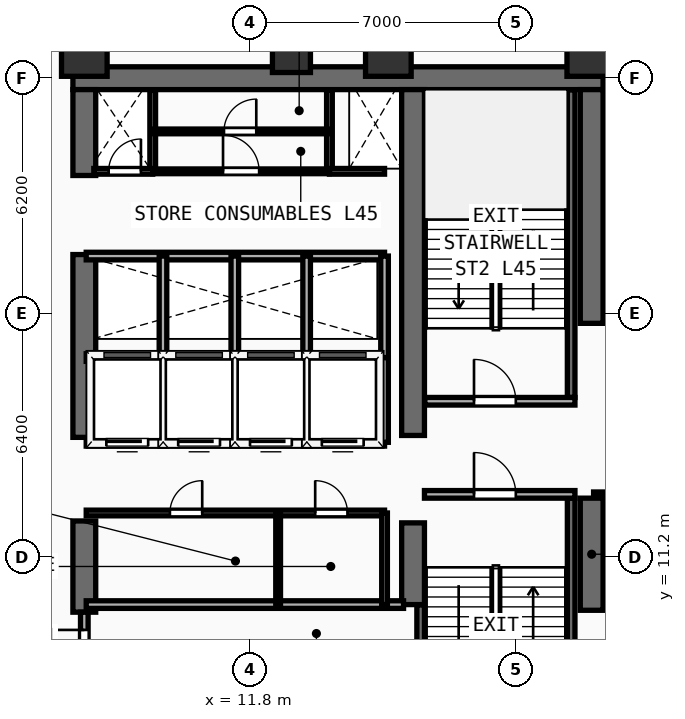
"""IFC4 building model, lengths in metres.
Left out: names, types, materials, properties, quantities, classifications, styles, units other than length and angle.
Written with IfcOpenShell. Run it as: python <this file> out.ifc"""

import sys

from ifc_helpers import new_model, si_unit, direction, frame, frame_2d, origin, origin_2d, place, context, subcontext, project, spatial, rectangle, extrude, element, fill, save


model = new_model("IFC4")
c1 = context("Model", 3, precision=1e-05, world=origin(), true_north=direction((0.0, 1.0)))
c2 = subcontext(c1, "Body", "Model", "MODEL_VIEW")
j1 = project(units=[si_unit("LENGTHUNIT", "METRE"), si_unit("PLANEANGLEUNIT", "RADIAN")], contexts=[c1])
p1 = place(None, origin())
s1 = spatial("IfcSite", under=j1, at=p1, CompositionType="ELEMENT")
p2 = place(p1, origin())
s2 = spatial("IfcBuilding", under=s1, at=p2, CompositionType="ELEMENT")
p3 = place(p2, frame((0.0, 0.0, 176.6)))
s3 = spatial("IfcBuildingStorey", under=s2, at=p3, CompositionType="ELEMENT", Elevation=176.6)
p4 = place(p3, frame((7.15, 23.8, 0.0), z_axis=(0.0, 0.0, 1.0), x_axis=(1.0, 0.0, 0.0)))
e1 = element("IfcWall", 1, at=p4, inside=s3, PredefinedType="SHEAR", context=c2, shape_type="SweptSolid", body=[
    extrude(rectangle(XDim=13.95, YDim=0.6, at=frame_2d((6.975, 0.0))), origin(), (0.0, 0.0, 1.0), 3.56),
])
p5 = place(p3, frame((7.45, 9.75, 0.0), z_axis=(0.0, 0.0, 1.0), x_axis=(0.0, 1.0, 0.0)))
e2 = element("IfcWall", 2, at=p5, inside=s3, PredefinedType="SHEAR", context=c2, shape_type="SweptSolid", body=[
    extrude(rectangle(XDim=2.4, YDim=0.6, at=frame_2d((1.2, 0.0))), origin(), (0.0, 0.0, 1.0), 3.56),
])
p6 = place(p3, frame((7.45, 14.35, 0.0), z_axis=(0.0, 0.0, 1.0), x_axis=(0.0, 1.0, 0.0)))
e3 = element("IfcWall", 3, at=p6, inside=s3, PredefinedType="SHEAR", context=c2, shape_type="SweptSolid", body=[
    extrude(rectangle(XDim=4.81, YDim=0.6, at=frame_2d((2.405, 0.0))), origin(), (0.0, 0.0, 1.0), 3.56),
])
p7 = place(p3, frame((7.45, 21.24, 0.0), z_axis=(0.0, 0.0, 1.0), x_axis=(0.0, 1.0, 0.0)))
e4 = element("IfcWall", 4, at=p7, inside=s3, PredefinedType="SHEAR", context=c2, shape_type="SweptSolid", body=[
    extrude(rectangle(XDim=2.26, YDim=0.6, at=frame_2d((1.13, 0.0))), origin(), (0.0, 0.0, 1.0), 3.56),
])
p8 = place(p3, frame((20.8, 9.8, 0.0), z_axis=(0.0, 0.0, 1.0), x_axis=(0.0, 1.0, 0.0)))
e5 = element("IfcWall", 5, at=p8, inside=s3, PredefinedType="SHEAR", context=c2, shape_type="SweptSolid", body=[
    extrude(rectangle(XDim=2.95, YDim=0.6, at=frame_2d((1.475, 0.0))), origin(), (0.0, 0.0, 1.0), 3.56),
])
p9 = place(p3, frame((20.8, 17.35, 0.0), z_axis=(0.0, 0.0, 1.0), x_axis=(0.0, 1.0, 0.0)))
e6 = element("IfcWall", 6, at=p9, inside=s3, PredefinedType="SHEAR", context=c2, shape_type="SweptSolid", body=[
    extrude(rectangle(XDim=6.15, YDim=0.6, at=frame_2d((3.075, 0.0))), origin(), (0.0, 0.0, 1.0), 3.56),
])
p10 = place(p3, frame((16.1, 9.95, 0.0), z_axis=(0.0, 0.0, 1.0), x_axis=(0.0, 1.0, 0.0)))
e7 = element("IfcWall", 7, at=p10, inside=s3, PredefinedType="SHEAR", context=c2, shape_type="SweptSolid", body=[
    extrude(rectangle(XDim=2.15, YDim=0.6, at=frame_2d((1.075, 0.0))), origin(), (0.0, 0.0, 1.0), 3.56),
])
p11 = place(p3, frame((16.1, 14.4, 0.0), z_axis=(0.0, 0.0, 1.0), x_axis=(0.0, 1.0, 0.0)))
e8 = element("IfcWall", 8, at=p11, inside=s3, PredefinedType="SHEAR", context=c2, shape_type="SweptSolid", body=[
    extrude(rectangle(XDim=9.1, YDim=0.6, at=frame_2d((4.55, 0.0))), origin(), (0.0, 0.0, 1.0), 3.56),
])
for number, where, z_axis, x_axis in (
    (9, (7.45, 24.45, 0.0), (0.0, 0.0, 1.0), (1.0, 0.0, 0.0)),
    (10, (15.45, 24.45, 0.0), (0.0, 0.0, 1.0), (1.0, 0.0, 0.0)),
    (11, (20.75, 24.45, 0.0), (0.0, 0.0, 1.0), (1.0, 0.0, 0.0)),
):
    element("IfcColumn", number, at=place(p3, frame(where, z_axis=z_axis, x_axis=x_axis)), inside=s3, PredefinedType="COLUMN", context=c2, shape_type="SweptSolid", body=[
        extrude(rectangle(XDim=1.2, YDim=1.2, at=origin_2d()), origin(), (0.0, 0.0, 1.0), 3.56),
    ])
p12 = place(p3, frame((12.9, 24.45, 0.0), z_axis=(0.0, 0.0, 1.0), x_axis=(1.0, 0.0, 0.0)))
e12 = element("IfcColumn", 12, at=p12, inside=s3, PredefinedType="COLUMN", context=c2, shape_type="SweptSolid", body=[
    extrude(rectangle(XDim=1.0, YDim=1.0, at=origin_2d()), origin(), (0.0, 0.0, 1.0), 3.56),
])
p13 = place(p3, frame((16.3, 7.36, 0.0), z_axis=(0.0, 0.0, 1.0), x_axis=(0.0, 1.0, 0.0)))
e13 = element("IfcWall", 13, at=p13, inside=s3, PredefinedType="SHEAR", context=c2, shape_type="SweptSolid", body=[
    extrude(rectangle(XDim=2.58, YDim=0.2, at=frame_2d((1.29, 0.0))), origin(), (0.0, 0.0, 1.0), 3.56),
])
p14 = place(p3, frame((20.26, 4.66, 0.0), z_axis=(0.0, 0.0, 1.0), x_axis=(0.0, 1.0, 0.0)))
e14 = element("IfcWall", 14, at=p14, inside=s3, PredefinedType="SHEAR", context=c2, shape_type="SweptSolid", body=[
    extrude(rectangle(XDim=8.09, YDim=0.2, at=frame_2d((4.045, 0.0))), origin(), (0.0, 0.0, 1.0), 3.56),
])
p15 = place(p3, frame((16.4, 12.85, 0.0), z_axis=(0.0, 0.0, 1.0), x_axis=(1.0, 0.0, 0.0)))
e15 = element("IfcWall", 15, at=p15, inside=s3, PredefinedType="PARTITIONING", context=c2, shape_type="SweptSolid", body=[
    extrude(rectangle(XDim=3.96, YDim=0.2, at=frame_2d((1.98, 0.0))), origin(), (0.0, 0.0, 1.0), 3.56),
])
p16 = place(p15, frame((1.304, 0.0, 0.0)))
e16 = element("IfcOpeningElement", 16, at=p16, cuts=e15, PredefinedType="OPENING", context=c2, shape_type="SweptSolid", body=[
    extrude(rectangle(XDim=1.1, YDim=2.2, at=frame_2d((0.55, 1.1))), frame((0.0, 0.11, 0.0), z_axis=(0.0, -1.0, 0.0), x_axis=(1.0, 0.0, 0.0)), (0.0, 0.0, 1.0), 0.22),
])
p17 = place(p3, frame((20.26, 15.4, 0.0), z_axis=(0.0, 0.0, 1.0), x_axis=(0.0, 1.0, 0.0)))
e17 = element("IfcWall", 17, at=p17, inside=s3, PredefinedType="SHEAR", context=c2, shape_type="SweptSolid", body=[
    extrude(rectangle(XDim=8.09, YDim=0.2, at=frame_2d((4.045, 0.0))), origin(), (0.0, 0.0, 1.0), 3.56),
])
p18 = place(p3, frame((16.41, 15.3, 0.0), z_axis=(0.0, 0.0, 1.0), x_axis=(1.0, 0.0, 0.0)))
e18 = element("IfcWall", 18, at=p18, inside=s3, PredefinedType="PARTITIONING", context=c2, shape_type="SweptSolid", body=[
    extrude(rectangle(XDim=3.95, YDim=0.2, at=frame_2d((1.975, 0.0))), origin(), (0.0, 0.0, 1.0), 3.56),
])
p19 = place(p18, frame((1.294, 0.0, 0.0)))
e19 = element("IfcOpeningElement", 19, at=p19, cuts=e18, PredefinedType="OPENING", context=c2, shape_type="SweptSolid", body=[
    extrude(rectangle(XDim=1.1, YDim=2.2, at=frame_2d((0.55, 1.1))), frame((0.0, 0.11, 0.0), z_axis=(0.0, -1.0, 0.0), x_axis=(1.0, 0.0, 0.0)), (0.0, 0.0, 1.0), 0.22),
])
p20 = place(p3, frame((7.5, 9.95, 0.0), z_axis=(0.0, 0.0, 1.0), x_axis=(1.0, 0.0, 0.0)))
e20 = element("IfcWall", 20, at=p20, inside=s3, PredefinedType="PARTITIONING", context=c2, shape_type="SweptSolid", body=[
    extrude(rectangle(XDim=8.35, YDim=0.2, at=frame_2d((4.175, 0.0))), origin(), (0.0, 0.0, 1.0), 3.56),
])
p21 = place(p3, frame((7.45, 7.45, 0.0), z_axis=(0.0, 0.0, 1.0), x_axis=(0.0, 1.0, 0.0)))
e21 = element("IfcWall", 21, at=p21, inside=s3, PredefinedType="PARTITIONING", context=c2, shape_type="SweptSolid", body=[
    extrude(rectangle(XDim=2.3, YDim=0.2, at=frame_2d((1.15, 0.0))), origin(), (0.0, 0.0, 1.0), 2.54),
])
p22 = place(p21, frame((0.633, 0.0, 0.0)))
e22 = element("IfcOpeningElement", 22, at=p22, cuts=e21, PredefinedType="OPENING", context=c2, shape_type="SweptSolid", body=[
    extrude(rectangle(XDim=1.2, YDim=2.25, at=frame_2d((0.6, 1.125))), frame((0.0, 0.11, 0.0), z_axis=(0.0, -1.0, 0.0), x_axis=(1.0, 0.0, 0.0)), (0.0, 0.0, 1.0), 0.22),
])
p23 = place(p3, frame((7.5, 12.36, 0.0), z_axis=(0.0, 0.0, 1.0), x_axis=(1.0, 0.0, 0.0)))
e23 = element("IfcWall", 23, at=p23, inside=s3, PredefinedType="PARTITIONING", context=c2, shape_type="SweptSolid", body=[
    extrude(rectangle(XDim=7.85, YDim=0.15, at=frame_2d((3.925, 0.0))), origin(), (0.0, 0.0, 1.0), 3.56),
])
p24 = place(p23, frame((2.202, 0.0, 0.0)))
e24 = element("IfcOpeningElement", 24, at=p24, cuts=e23, PredefinedType="OPENING", context=c2, shape_type="SweptSolid", body=[
    extrude(rectangle(XDim=0.85, YDim=2.15, at=frame_2d((0.425, 1.075))), frame((0.0, 0.085, 0.0), z_axis=(0.0, -1.0, 0.0), x_axis=(1.0, 0.0, 0.0)), (0.0, 0.0, 1.0), 0.17),
])
p25 = place(p23, frame((6.025, 0.0, 0.0)))
e25 = element("IfcOpeningElement", 25, at=p25, cuts=e23, PredefinedType="OPENING", context=c2, shape_type="SweptSolid", body=[
    extrude(rectangle(XDim=0.85, YDim=2.15, at=frame_2d((0.425, 1.075))), frame((0.0, 0.085, 0.0), z_axis=(0.0, -1.0, 0.0), x_axis=(1.0, 0.0, 0.0)), (0.0, 0.0, 1.0), 0.17),
])
p26 = place(p3, frame((15.35, 9.95, 0.0), z_axis=(0.0, 0.0, 1.0), x_axis=(0.0, 1.0, 0.0)))
e26 = element("IfcWall", 26, at=p26, inside=s3, PredefinedType="PARTITIONING", context=c2, shape_type="SweptSolid", body=[
    extrude(rectangle(XDim=2.41, YDim=0.15, at=frame_2d((1.205, 0.0))), origin(), (0.0, 0.0, 1.0), 3.56),
])
p27 = place(p3, frame((12.55, 9.95, 0.0), z_axis=(0.0, 0.0, 1.0), x_axis=(0.0, 1.0, 0.0)))
e27 = element("IfcWall", 27, at=p27, inside=s3, PredefinedType="PARTITIONING", context=c2, shape_type="SweptSolid", body=[
    extrude(rectangle(XDim=2.41, YDim=0.125, at=frame_2d((1.205, 0.0))), origin(), (0.0, 0.0, 1.0), 3.56),
])
p28 = place(p3, frame((7.5, 14.22, 0.0), z_axis=(0.0, 0.0, 1.0), x_axis=(1.0, 0.0, 0.0)))
e28 = element("IfcWall", 28, at=p28, inside=s3, PredefinedType="PARTITIONING", context=c2, shape_type="SweptSolid", body=[
    extrude(rectangle(XDim=7.85, YDim=0.2, at=frame_2d((3.925, 0.0))), origin(), (0.0, 0.0, 1.0), 3.56),
])
p29 = place(p28, frame((0.53, 0.0, 0.0)))
e29 = element("IfcOpeningElement", 29, at=p29, cuts=e28, PredefinedType="OPENING", context=c2, shape_type="SweptSolid", body=[
    extrude(rectangle(XDim=1.1, YDim=2.2, at=frame_2d((0.55, 1.1))), frame((0.0, 0.11, 0.0), z_axis=(0.0, -1.0, 0.0), x_axis=(1.0, 0.0, 0.0)), (0.0, 0.0, 1.0), 0.22),
])
p30 = place(p28, frame((2.42, 0.0, 0.0)))
e30 = element("IfcOpeningElement", 30, at=p30, cuts=e28, PredefinedType="OPENING", context=c2, shape_type="SweptSolid", body=[
    extrude(rectangle(XDim=1.1, YDim=2.2, at=frame_2d((0.55, 1.1))), frame((0.0, 0.11, 0.0), z_axis=(0.0, -1.0, 0.0), x_axis=(1.0, 0.0, 0.0)), (0.0, 0.0, 1.0), 0.22),
])
p31 = place(p28, frame((4.31, 0.0, 0.0)))
e31 = element("IfcOpeningElement", 31, at=p31, cuts=e28, PredefinedType="OPENING", context=c2, shape_type="SweptSolid", body=[
    extrude(rectangle(XDim=1.1, YDim=2.2, at=frame_2d((0.55, 1.1))), frame((0.0, 0.11, 0.0), z_axis=(0.0, -1.0, 0.0), x_axis=(1.0, 0.0, 0.0)), (0.0, 0.0, 1.0), 0.22),
])
p32 = place(p28, frame((6.2, 0.0, 0.0)))
e32 = element("IfcOpeningElement", 32, at=p32, cuts=e28, PredefinedType="OPENING", context=c2, shape_type="SweptSolid", body=[
    extrude(rectangle(XDim=1.1, YDim=2.2, at=frame_2d((0.55, 1.1))), frame((0.0, 0.11, 0.0), z_axis=(0.0, -1.0, 0.0), x_axis=(1.0, 0.0, 0.0)), (0.0, 0.0, 1.0), 0.22),
])
p33 = place(p3, frame((7.5, 16.45, 0.0), z_axis=(0.0, 0.0, 1.0), x_axis=(1.0, 0.0, 0.0)))
e33 = element("IfcWall", 33, at=p33, inside=s3, PredefinedType="PARTITIONING", context=c2, shape_type="SweptSolid", body=[
    extrude(rectangle(XDim=7.85, YDim=0.2, at=frame_2d((3.925, 0.0))), origin(), (0.0, 0.0, 1.0), 3.56),
])
for number, where, z_axis, x_axis in (
    (34, (15.35, 14.22, 0.0), (0.0, 0.0, 1.0), (0.0, 1.0, 0.0)),
    (35, (9.52, 14.22, 0.0), (0.0, 0.0, 1.0), (0.0, 1.0, 0.0)),
    (36, (11.41, 14.22, 0.0), (0.0, 0.0, 1.0), (0.0, 1.0, 0.0)),
    (37, (13.3, 14.22, 0.0), (0.0, 0.0, 1.0), (0.0, 1.0, 0.0)),
):
    element("IfcWall", number, at=place(p3, frame(where, z_axis=z_axis, x_axis=x_axis)), inside=s3, PredefinedType="PARTITIONING", context=c2, shape_type="SweptSolid", body=[
        extrude(rectangle(XDim=2.23, YDim=0.2, at=frame_2d((1.115, 0.0))), origin(), (0.0, 0.0, 1.0), 3.56),
    ])
p34 = place(p3, frame((7.5, 19.12, 0.0), z_axis=(0.0, 0.0, 1.0), x_axis=(1.0, 0.0, 0.0)))
e38 = element("IfcWall", 38, at=p34, inside=s3, PredefinedType="PARTITIONING", context=c2, shape_type="SweptSolid", body=[
    extrude(rectangle(XDim=7.85, YDim=0.2, at=frame_2d((3.925, 0.0))), origin(), (0.0, 0.0, 1.0), 3.56),
])
for number, where, z_axis, x_axis in (
    (39, (15.35, 16.45, 0.0), (0.0, 0.0, 1.0), (0.0, 1.0, 0.0)),
    (40, (9.52, 16.45, 0.0), (0.0, 0.0, 1.0), (0.0, 1.0, 0.0)),
    (41, (11.41, 16.45, 0.0), (0.0, 0.0, 1.0), (0.0, 1.0, 0.0)),
    (42, (13.3, 16.45, 0.0), (0.0, 0.0, 1.0), (0.0, 1.0, 0.0)),
):
    element("IfcWall", number, at=place(p3, frame(where, z_axis=z_axis, x_axis=x_axis)), inside=s3, PredefinedType="PARTITIONING", context=c2, shape_type="SweptSolid", body=[
        extrude(rectangle(XDim=2.67, YDim=0.2, at=frame_2d((1.335, 0.0))), origin(), (0.0, 0.0, 1.0), 3.56),
    ])
for number, where, z_axis, x_axis in (
    (43, (9.25, 21.35, 0.0), (0.0, 0.0, 1.0), (0.0, 1.0, 0.0)),
    (44, (13.9, 21.35, 0.0), (0.0, 0.0, 1.0), (0.0, 1.0, 0.0)),
):
    element("IfcWall", number, at=place(p3, frame(where, z_axis=z_axis, x_axis=x_axis)), inside=s3, PredefinedType="PARTITIONING", context=c2, shape_type="SweptSolid", body=[
        extrude(rectangle(XDim=2.13, YDim=0.15, at=frame_2d((1.065, 0.0))), origin(), (0.0, 0.0, 1.0), 3.56),
    ])
p35 = place(p3, frame((7.7, 21.35, 0.0), z_axis=(0.0, 0.0, 1.0), x_axis=(1.0, 0.0, 0.0)))
e45 = element("IfcWall", 45, at=p35, inside=s3, PredefinedType="PARTITIONING", context=c2, shape_type="SweptSolid", body=[
    extrude(rectangle(XDim=1.55, YDim=0.15, at=frame_2d((0.775, 0.0))), origin(), (0.0, 0.0, 1.0), 3.56),
])
p36 = place(p35, frame((0.39, 0.0, 0.0)))
e46 = element("IfcOpeningElement", 46, at=p36, cuts=e45, PredefinedType="OPENING", context=c2, shape_type="SweptSolid", body=[
    extrude(rectangle(XDim=0.85, YDim=2.15, at=frame_2d((0.425, 1.075))), frame((0.0, 0.085, 0.0), z_axis=(0.0, -1.0, 0.0), x_axis=(1.0, 0.0, 0.0)), (0.0, 0.0, 1.0), 0.17),
])
p37 = place(p3, frame((13.9, 21.35, 0.0), z_axis=(0.0, 0.0, 1.0), x_axis=(1.0, 0.0, 0.0)))
e47 = element("IfcWall", 47, at=p37, inside=s3, PredefinedType="PARTITIONING", context=c2, shape_type="SweptSolid", body=[
    extrude(rectangle(XDim=1.45, YDim=0.15, at=frame_2d((0.725, 0.0))), origin(), (0.0, 0.0, 1.0), 3.56),
])
p38 = place(p3, frame((9.25, 21.35, 0.0), z_axis=(0.0, 0.0, 1.0), x_axis=(1.0, 0.0, 0.0)))
e48 = element("IfcWall", 48, at=p38, inside=s3, PredefinedType="PARTITIONING", context=c2, shape_type="SweptSolid", body=[
    extrude(rectangle(XDim=4.65, YDim=0.125, at=frame_2d((2.325, 0.0))), origin(), (0.0, 0.0, 1.0), 3.56),
])
p39 = place(p38, frame((1.85, 0.0, 0.0)))
e49 = element("IfcOpeningElement", 49, at=p39, cuts=e48, PredefinedType="OPENING", context=c2, shape_type="SweptSolid", body=[
    extrude(rectangle(XDim=0.95, YDim=2.15, at=frame_2d((0.475, 1.075))), frame((0.0, 0.073, 0.0), z_axis=(0.0, -1.0, 0.0), x_axis=(1.0, 0.0, 0.0)), (0.0, 0.0, 1.0), 0.145),
])
p40 = place(p3, frame((9.25, 22.4, 0.0), z_axis=(0.0, 0.0, 1.0), x_axis=(1.0, 0.0, 0.0)))
e50 = element("IfcWall", 50, at=p40, inside=s3, PredefinedType="PARTITIONING", context=c2, shape_type="SweptSolid", body=[
    extrude(rectangle(XDim=4.65, YDim=0.125, at=frame_2d((2.325, 0.0))), origin(), (0.0, 0.0, 1.0), 3.56),
])
p41 = place(p40, frame((1.875, 0.0, 0.0)))
e51 = element("IfcOpeningElement", 51, at=p41, cuts=e50, PredefinedType="OPENING", context=c2, shape_type="SweptSolid", body=[
    extrude(rectangle(XDim=0.85, YDim=2.15, at=frame_2d((0.425, 1.075))), frame((0.0, 0.073, 0.0), z_axis=(0.0, -1.0, 0.0), x_axis=(1.0, 0.0, 0.0)), (0.0, 0.0, 1.0), 0.145),
])
p42 = place(p3, frame((20.85, 12.85, 0.0), z_axis=(0.0, 0.0, 1.0), x_axis=(1.0, 0.0, 0.0)))
e52 = element("IfcWall", 52, at=p42, inside=s3, PredefinedType="PARTITIONING", context=c2, shape_type="SweptSolid", body=[
    extrude(rectangle(XDim=7.05, YDim=0.125, at=frame_2d((3.525, 0.0))), origin(), (0.0, 0.0, 1.0), 3.56),
])
p43 = place(p42, frame((2.8, 0.0, 0.0)))
e53 = element("IfcOpeningElement", 53, at=p43, cuts=e52, PredefinedType="OPENING", context=c2, shape_type="SweptSolid", body=[
    extrude(rectangle(XDim=0.95, YDim=2.15, at=frame_2d((0.475, 1.075))), frame((0.0, 0.073, 0.0), z_axis=(0.0, -1.0, 0.0), x_axis=(1.0, 0.0, 0.0)), (0.0, 0.0, 1.0), 0.145),
])
p44 = place(p16, frame((1.1, 0.0, 0.0), z_axis=(0.0, 0.0, 1.0), x_axis=(-1.0, 0.0, 0.0)))
e54 = element("IfcDoor", 54, at=p44, inside=s3, OperationType="SINGLE_SWING_RIGHT", PredefinedType="DOOR", context=c2, shape_type="SweptSolid", body=[
    extrude(rectangle(XDim=1.1, YDim=2.2, at=frame_2d((0.55, 1.1))), frame((0.0, 0.025, 0.0), z_axis=(0.0, -1.0, 0.0), x_axis=(1.0, 0.0, 0.0)), (0.0, 0.0, 1.0), 0.05),
])
fill(e16, e54)
p45 = place(p19, origin())
e55 = element("IfcDoor", 55, at=p45, inside=s3, OperationType="SINGLE_SWING_LEFT", PredefinedType="DOOR", context=c2, shape_type="SweptSolid", body=[
    extrude(rectangle(XDim=1.1, YDim=2.2, at=frame_2d((0.55, 1.1))), frame((0.0, 0.025, 0.0), z_axis=(0.0, -1.0, 0.0), x_axis=(1.0, 0.0, 0.0)), (0.0, 0.0, 1.0), 0.05),
])
fill(e19, e55)
p46 = place(p22, frame((1.2, 0.0, 0.0), z_axis=(0.0, 0.0, 1.0), x_axis=(-1.0, 0.0, 0.0)))
e56 = element("IfcDoor", 56, at=p46, inside=s3, OperationType="SINGLE_SWING_LEFT", PredefinedType="DOOR", context=c2, shape_type="SweptSolid", body=[
    extrude(rectangle(XDim=1.2, YDim=2.25, at=frame_2d((0.6, 1.125))), frame((0.0, 0.025, 0.0), z_axis=(0.0, -1.0, 0.0), x_axis=(1.0, 0.0, 0.0)), (0.0, 0.0, 1.0), 0.05),
])
fill(e22, e56)
p47 = place(p24, origin())
e57 = element("IfcDoor", 57, at=p47, inside=s3, OperationType="SINGLE_SWING_RIGHT", PredefinedType="DOOR", context=c2, shape_type="SweptSolid", body=[
    extrude(rectangle(XDim=0.85, YDim=2.15, at=frame_2d((0.425, 1.075))), frame((0.0, 0.025, 0.0), z_axis=(0.0, -1.0, 0.0), x_axis=(1.0, 0.0, 0.0)), (0.0, 0.0, 1.0), 0.05),
])
fill(e24, e57)
p48 = place(p25, origin())
e58 = element("IfcDoor", 58, at=p48, inside=s3, OperationType="SINGLE_SWING_LEFT", PredefinedType="DOOR", context=c2, shape_type="SweptSolid", body=[
    extrude(rectangle(XDim=0.85, YDim=2.15, at=frame_2d((0.425, 1.075))), frame((0.0, 0.025, 0.0), z_axis=(0.0, -1.0, 0.0), x_axis=(1.0, 0.0, 0.0)), (0.0, 0.0, 1.0), 0.05),
])
fill(e25, e58)
p49 = place(p29, frame((1.1, 0.0, 0.0), z_axis=(0.0, 0.0, 1.0), x_axis=(-1.0, 0.0, 0.0)))
e59 = element("IfcDoor", 59, at=p49, inside=s3, OperationType="SLIDING_TO_LEFT", PredefinedType="DOOR", context=c2, shape_type="SweptSolid", body=[
    extrude(rectangle(XDim=1.1, YDim=2.2, at=frame_2d((0.55, 1.1))), frame((0.0, 0.025, 0.0), z_axis=(0.0, -1.0, 0.0), x_axis=(1.0, 0.0, 0.0)), (0.0, 0.0, 1.0), 0.05),
])
fill(e29, e59)
p50 = place(p30, frame((1.1, 0.0, 0.0), z_axis=(0.0, 0.0, 1.0), x_axis=(-1.0, 0.0, 0.0)))
e60 = element("IfcDoor", 60, at=p50, inside=s3, OperationType="SLIDING_TO_LEFT", PredefinedType="DOOR", context=c2, shape_type="SweptSolid", body=[
    extrude(rectangle(XDim=1.1, YDim=2.2, at=frame_2d((0.55, 1.1))), frame((0.0, 0.025, 0.0), z_axis=(0.0, -1.0, 0.0), x_axis=(1.0, 0.0, 0.0)), (0.0, 0.0, 1.0), 0.05),
])
fill(e30, e60)
p51 = place(p31, frame((1.1, 0.0, 0.0), z_axis=(0.0, 0.0, 1.0), x_axis=(-1.0, 0.0, 0.0)))
e61 = element("IfcDoor", 61, at=p51, inside=s3, OperationType="SLIDING_TO_LEFT", PredefinedType="DOOR", context=c2, shape_type="SweptSolid", body=[
    extrude(rectangle(XDim=1.1, YDim=2.2, at=frame_2d((0.55, 1.1))), frame((0.0, 0.025, 0.0), z_axis=(0.0, -1.0, 0.0), x_axis=(1.0, 0.0, 0.0)), (0.0, 0.0, 1.0), 0.05),
])
fill(e31, e61)
p52 = place(p32, frame((1.1, 0.0, 0.0), z_axis=(0.0, 0.0, 1.0), x_axis=(-1.0, 0.0, 0.0)))
e62 = element("IfcDoor", 62, at=p52, inside=s3, OperationType="SLIDING_TO_LEFT", PredefinedType="DOOR", context=c2, shape_type="SweptSolid", body=[
    extrude(rectangle(XDim=1.1, YDim=2.2, at=frame_2d((0.55, 1.1))), frame((0.0, 0.025, 0.0), z_axis=(0.0, -1.0, 0.0), x_axis=(1.0, 0.0, 0.0)), (0.0, 0.0, 1.0), 0.05),
])
fill(e32, e62)
p53 = place(p36, origin())
e63 = element("IfcDoor", 63, at=p53, inside=s3, OperationType="SINGLE_SWING_RIGHT", PredefinedType="DOOR", context=c2, shape_type="SweptSolid", body=[
    extrude(rectangle(XDim=0.85, YDim=2.15, at=frame_2d((0.425, 1.075))), frame((0.0, 0.025, 0.0), z_axis=(0.0, -1.0, 0.0), x_axis=(1.0, 0.0, 0.0)), (0.0, 0.0, 1.0), 0.05),
])
fill(e46, e63)
p54 = place(p39, origin())
e64 = element("IfcDoor", 64, at=p54, inside=s3, OperationType="SINGLE_SWING_LEFT", PredefinedType="DOOR", context=c2, shape_type="SweptSolid", body=[
    extrude(rectangle(XDim=0.95, YDim=2.15, at=frame_2d((0.475, 1.075))), frame((0.0, 0.025, 0.0), z_axis=(0.0, -1.0, 0.0), x_axis=(1.0, 0.0, 0.0)), (0.0, 0.0, 1.0), 0.05),
])
fill(e49, e64)
p55 = place(p41, origin())
e65 = element("IfcDoor", 65, at=p55, inside=s3, OperationType="SINGLE_SWING_RIGHT", PredefinedType="DOOR", context=c2, shape_type="SweptSolid", body=[
    extrude(rectangle(XDim=0.85, YDim=2.15, at=frame_2d((0.425, 1.075))), frame((0.0, 0.025, 0.0), z_axis=(0.0, -1.0, 0.0), x_axis=(1.0, 0.0, 0.0)), (0.0, 0.0, 1.0), 0.05),
])
fill(e51, e65)
save(model, sys.argv[1])
